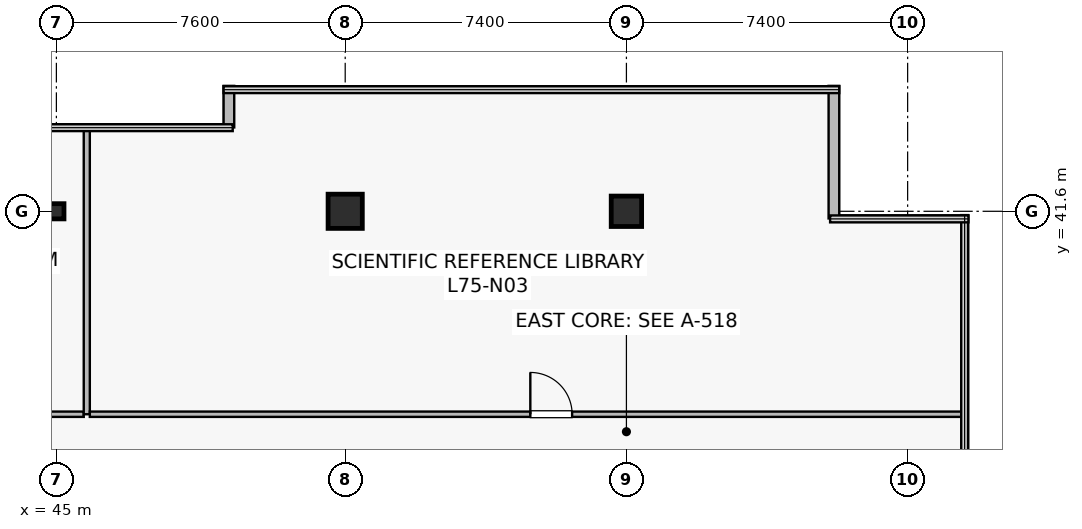
"""IFC4 building model, lengths in metres.
Left out: names, types, materials, properties, quantities, classifications, styles, units other than length and angle.
Written with IfcOpenShell. Run it as: python <this file> out.ifc"""

import sys

from ifc_helpers import new_model, si_unit, direction, frame, frame_2d, origin, origin_2d, place, context, subcontext, project, spatial, rectangle, i_section, extrude, source, transform, mapped, element, fill, save


model = new_model("IFC4")
c1 = context("Model", 3, precision=1e-05, world=origin(), true_north=direction((0.0, 1.0)))
c2 = subcontext(c1, "Body", "Model", "MODEL_VIEW")
j1 = project(units=[si_unit("LENGTHUNIT", "METRE"), si_unit("PLANEANGLEUNIT", "RADIAN")], contexts=[c1])
p1 = place(None, origin())
s1 = spatial("IfcSite", under=j1, at=p1, CompositionType="ELEMENT")
p2 = place(p1, origin())
s2 = spatial("IfcBuilding", under=s1, at=p2, CompositionType="ELEMENT")
p3 = place(p2, frame((0.0, 0.0, 314.4)))
s3 = spatial("IfcBuildingStorey", under=s2, at=p3, CompositionType="ELEMENT", Elevation=314.4)
m1 = source(origin(), c2, "Body", "SweptSolid", [
    extrude(rectangle(XDim=0.9, YDim=0.9, at=origin_2d()), origin(), (0.0, 0.0, 1.0), 4.2),
])
p4 = place(p3, frame((52.6, 41.6, 0.0), z_axis=(0.0, 0.0, 1.0), x_axis=(1.0, 0.0, 0.0)))
e1 = element("IfcColumn", 1, at=p4, inside=s3, PredefinedType="COLUMN", context=c2, shape_type="MappedRepresentation", body=[
    mapped(m1, transform((0.0, 0.0, 0.0), scale=1.0)),
])
m2 = source(origin(), c2, "Body", "SweptSolid", [
    extrude(rectangle(XDim=0.8, YDim=0.8, at=origin_2d()), origin(), (0.0, 0.0, 1.0), 4.2),
])
p5 = place(p3, frame((60.0, 41.6, 0.0), z_axis=(0.0, 0.0, 1.0), x_axis=(1.0, 0.0, 0.0)))
e2 = element("IfcColumn", 2, at=p5, inside=s3, PredefinedType="COLUMN", context=c2, shape_type="MappedRepresentation", body=[
    mapped(m2, transform((0.0, 0.0, 0.0), scale=1.0)),
])
m3 = source(origin(), c2, "Body", "SweptSolid", [
    extrude(i_section(OverallWidth=0.4, OverallDepth=0.4, WebThickness=0.021, FlangeThickness=0.021, at=origin_2d()), origin(), (0.0, 0.0, 1.0), 4.2),
])
p6 = place(p3, frame((45.0, 41.6, 0.0), z_axis=(0.0, 0.0, 1.0), x_axis=(1.0, 0.0, 0.0)))
e3 = element("IfcColumn", 3, at=p6, inside=s3, PredefinedType="COLUMN", context=c2, shape_type="MappedRepresentation", body=[
    mapped(m3, transform((0.0, 0.0, 0.0), scale=1.0)),
])
p7 = place(p3, frame((65.46, 41.412, 0.0), z_axis=(0.0, 0.0, 1.0), x_axis=(0.0, 1.0, 0.0)))
e4 = element("IfcWall", 4, at=p7, inside=s3, PredefinedType="STANDARD", context=c2, shape_type="SweptSolid", body=[
    extrude(rectangle(XDim=3.488, YDim=0.28, at=frame_2d((1.744, 0.0))), origin(), (0.0, 0.0, 1.0), 3.9),
])
p8 = place(p3, frame((49.54, 44.9, 0.0), z_axis=(0.0, 0.0, 1.0), x_axis=(0.0, -1.0, 0.0)))
e5 = element("IfcWall", 5, at=p8, inside=s3, PredefinedType="STANDARD", context=c2, shape_type="SweptSolid", body=[
    extrude(rectangle(XDim=1.093, YDim=0.28, at=frame_2d((0.546, 0.0))), origin(), (0.0, 0.0, 1.0), 3.9),
])
p9 = place(p3, frame((22.88, 36.26, 0.0), z_axis=(0.0, 0.0, 1.0), x_axis=(1.0, 0.0, 0.0)))
e6 = element("IfcWall", 6, at=p9, inside=s3, PredefinedType="PARTITIONING", context=c2, shape_type="SweptSolid", body=[
    extrude(rectangle(XDim=22.84, YDim=0.14, at=frame_2d((11.42, 0.0))), origin(), (0.0, 0.0, 1.0), 3.297),
])
p10 = place(p9, frame((8.976, 0.0, 0.0)))
e7 = element("IfcOpeningElement", 7, at=p10, cuts=e6, PredefinedType="OPENING", context=c2, shape_type="SweptSolid", body=[
    extrude(rectangle(XDim=1.1, YDim=2.18, at=frame_2d((0.55, 1.09))), frame((0.0, 0.08, 0.0), z_axis=(0.0, -1.0, 0.0), x_axis=(1.0, 0.0, 0.0)), (0.0, 0.0, 1.0), 0.16),
])
p11 = place(p3, frame((45.8, 36.26, 0.0), z_axis=(0.0, 0.0, 1.0), x_axis=(0.0, 1.0, 0.0)))
e8 = element("IfcWall", 8, at=p11, inside=s3, PredefinedType="PARTITIONING", context=c2, shape_type="SweptSolid", body=[
    extrude(rectangle(XDim=7.53, YDim=0.16, at=frame_2d((3.765, 0.0))), origin(), (0.0, 0.0, 1.0), 2.985),
])
p12 = place(p3, frame((45.88, 36.26, 0.0), z_axis=(0.0, 0.0, 1.0), x_axis=(1.0, 0.0, 0.0)))
e9 = element("IfcWall", 9, at=p12, inside=s3, PredefinedType="PARTITIONING", context=c2, shape_type="SweptSolid", body=[
    extrude(rectangle(XDim=23.01, YDim=0.14, at=frame_2d((11.505, 0.0))), origin(), (0.0, 0.0, 1.0), 3.297),
])
p13 = place(p12, frame((11.591, 0.0, 0.0)))
e10 = element("IfcOpeningElement", 10, at=p13, cuts=e9, PredefinedType="OPENING", context=c2, shape_type="SweptSolid", body=[
    extrude(rectangle(XDim=1.1, YDim=2.18, at=frame_2d((0.55, 1.09))), frame((0.0, 0.08, 0.0), z_axis=(0.0, -1.0, 0.0), x_axis=(1.0, 0.0, 0.0)), (0.0, 0.0, 1.0), 0.16),
])
m4 = source(origin(), c2, "Body", "SweptSolid", [
    extrude(rectangle(XDim=1.1, YDim=2.18, at=frame_2d((0.55, 1.09))), frame((0.0, 0.025, 0.0), z_axis=(0.0, -1.0, 0.0), x_axis=(1.0, 0.0, 0.0)), (0.0, 0.0, 1.0), 0.05),
])
p14 = place(p13, origin())
e11 = element("IfcDoor", 11, at=p14, inside=s3, OperationType="SINGLE_SWING_LEFT", PredefinedType="DOOR", context=c2, shape_type="MappedRepresentation", body=[
    mapped(m4, transform((0.0, 0.0, 0.0), scale=1.0)),
])
fill(e10, e11)
save(model, sys.argv[1])
